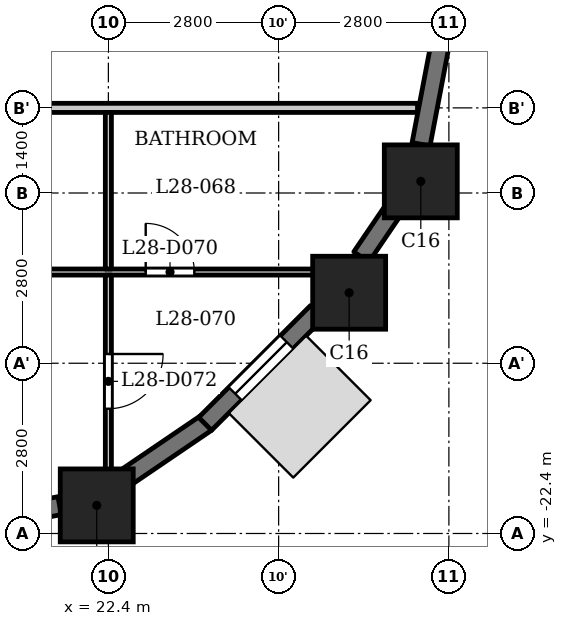
"""IFC4 building model, lengths in metres.
Left out: names, types, materials, properties, quantities, classifications, styles, units other than length and angle.
Written with IfcOpenShell. Run it as: python <this file> out.ifc"""

import sys

from ifc_helpers import new_model, si_unit, direction, frame, frame_2d, origin, origin_2d, place, context, subcontext, project, spatial, rectangle, extrude, element, fill, save


model = new_model("IFC4")
c1 = context("Model", 3, precision=1e-05, world=origin(), true_north=direction((0.0, 1.0)))
c2 = subcontext(c1, "Body", "Model", "MODEL_VIEW")
j1 = project(units=[si_unit("LENGTHUNIT", "METRE"), si_unit("PLANEANGLEUNIT", "RADIAN")], contexts=[c1])
p1 = place(None, origin())
s1 = spatial("IfcSite", under=j1, at=p1, CompositionType="ELEMENT")
p2 = place(p1, origin())
s2 = spatial("IfcBuilding", under=s1, at=p2, CompositionType="ELEMENT")
p3 = place(p2, frame((0.0, 0.0, 111.3)))
s3 = spatial("IfcBuildingStorey", under=s2, at=p3, CompositionType="ELEMENT", Elevation=111.3)
for number, where, z_axis, x_axis in (
    (1, (22.209, -21.938, 0.0), (0.0, 0.0, 1.0), (1.0, 0.0, 0.0)),
    (2, (26.36, -18.44, 0.0), (0.0, 0.0, 1.0), (1.0, 0.0, 0.0)),
    (3, (27.538, -16.609, 0.0), (0.0, 0.0, 1.0), (1.0, 0.0, 0.0)),
):
    element("IfcColumn", number, at=place(p3, frame(where, z_axis=z_axis, x_axis=x_axis)), inside=s3, PredefinedType="COLUMN", context=c2, shape_type="SweptSolid", body=[
        extrude(rectangle(XDim=1.2, YDim=1.2, at=origin_2d()), origin(), (0.0, 0.0, 1.0), 3.5),
    ])
for number, where, z_axis, x_axis in (
    (4, (19.972, -22.253, 0.0), (0.0, 0.0, 1.0), (0.982, 0.187, 0.0)),
    (5, (22.643, -21.51, 0.0), (0.0, 0.0, 1.0), (0.827, 0.562, 0.0)),
):
    element("IfcWall", number, at=place(p3, frame(where, z_axis=z_axis, x_axis=x_axis)), inside=s3, PredefinedType="SOLIDWALL", context=c2, shape_type="SweptSolid", body=[
        extrude(rectangle(XDim=1.656, YDim=0.3, at=frame_2d((0.828, 0.0))), origin(), (0.0, 0.0, 1.0), 2.4),
    ])
p4 = place(p3, frame((23.991, -20.597, 0.0), z_axis=(0.0, 0.0, 1.0), x_axis=(0.707106781187, 0.707106781187, 0.0)))
e6 = element("IfcWall", 6, at=p4, inside=s3, PredefinedType="SOLIDWALL", context=c2, shape_type="SweptSolid", body=[
    extrude(rectangle(XDim=2.6, YDim=0.3, at=frame_2d((1.3, 0.0))), origin(), (0.0, 0.0, 1.0), 2.4),
])
p5 = place(p4, frame((0.7, 0.0, 0.6)))
e7 = element("IfcOpeningElement", 7, at=p5, cuts=e6, PredefinedType="OPENING", context=c2, shape_type="SweptSolid", body=[
    extrude(rectangle(XDim=1.2, YDim=1.55, at=frame_2d((0.6, 0.775))), frame((0.0, 0.16, 0.0), z_axis=(0.0, -1.0, 0.0), x_axis=(1.0, 0.0, 0.0)), (0.0, 0.0, 1.0), 0.32),
])
p6 = place(p3, frame((26.561, -17.851, 0.0), z_axis=(0.0, 0.0, 1.0), x_axis=(0.562173331661, 0.827019434577, 0.0)))
e8 = element("IfcWall", 8, at=p6, inside=s3, PredefinedType="SOLIDWALL", context=c2, shape_type="SweptSolid", body=[
    extrude(rectangle(XDim=0.977, YDim=0.3, at=frame_2d((0.489, 0.0))), origin(), (0.0, 0.0, 1.0), 3.2),
])
p7 = place(p3, frame((27.542, -15.999, 0.0), z_axis=(0.0, 0.0, 1.0), x_axis=(0.187349172861, 0.982293381546, 0.0)))
e9 = element("IfcWall", 9, at=p7, inside=s3, PredefinedType="SOLIDWALL", context=c2, shape_type="SweptSolid", body=[
    extrude(rectangle(XDim=1.656, YDim=0.3, at=frame_2d((0.828, 0.0))), origin(), (0.0, 0.0, 1.0), 2.4),
])
p8 = place(p3, frame((-26.19, -18.1, 0.0), z_axis=(0.0, 0.0, 1.0), x_axis=(1.0, 0.0, 0.0)))
e10 = element("IfcWall", 10, at=p8, inside=s3, PredefinedType="PARTITIONING", context=c2, shape_type="SweptSolid", body=[
    extrude(rectangle(XDim=52.63, YDim=0.1, at=frame_2d((26.315, 0.0))), origin(), (0.0, 0.0, 1.0), 3.2),
])
p9 = place(p8, frame((1.09, 0.0, 0.0)))
e11 = element("IfcOpeningElement", 11, at=p9, cuts=e10, PredefinedType="OPENING", context=c2, shape_type="SweptSolid", body=[
    extrude(rectangle(XDim=0.8, YDim=2.1, at=frame_2d((0.4, 1.05))), frame((0.0, 0.06, 0.0), z_axis=(0.0, -1.0, 0.0), x_axis=(1.0, 0.0, 0.0)), (0.0, 0.0, 1.0), 0.12),
])
p10 = place(p8, frame((4.44, 0.0, 0.0)))
e12 = element("IfcOpeningElement", 12, at=p10, cuts=e10, PredefinedType="OPENING", context=c2, shape_type="SweptSolid", body=[
    extrude(rectangle(XDim=0.9, YDim=2.1, at=frame_2d((0.45, 1.05))), frame((0.0, 0.06, 0.0), z_axis=(0.0, -1.0, 0.0), x_axis=(1.0, 0.0, 0.0)), (0.0, 0.0, 1.0), 0.12),
])
p11 = place(p8, frame((10.14, 0.0, 0.0)))
e13 = element("IfcOpeningElement", 13, at=p11, cuts=e10, PredefinedType="OPENING", context=c2, shape_type="SweptSolid", body=[
    extrude(rectangle(XDim=0.8, YDim=2.1, at=frame_2d((0.4, 1.05))), frame((0.0, 0.06, 0.0), z_axis=(0.0, -1.0, 0.0), x_axis=(1.0, 0.0, 0.0)), (0.0, 0.0, 1.0), 0.12),
])
p12 = place(p8, frame((12.74, 0.0, 0.0)))
e14 = element("IfcOpeningElement", 14, at=p12, cuts=e10, PredefinedType="OPENING", context=c2, shape_type="SweptSolid", body=[
    extrude(rectangle(XDim=0.9, YDim=2.1, at=frame_2d((0.45, 1.05))), frame((0.0, 0.06, 0.0), z_axis=(0.0, -1.0, 0.0), x_axis=(1.0, 0.0, 0.0)), (0.0, 0.0, 1.0), 0.12),
])
p13 = place(p8, frame((16.14, 0.0, 0.0)))
e15 = element("IfcOpeningElement", 15, at=p13, cuts=e10, PredefinedType="OPENING", context=c2, shape_type="SweptSolid", body=[
    extrude(rectangle(XDim=0.9, YDim=2.1, at=frame_2d((0.45, 1.05))), frame((0.0, 0.06, 0.0), z_axis=(0.0, -1.0, 0.0), x_axis=(1.0, 0.0, 0.0)), (0.0, 0.0, 1.0), 0.12),
])
p14 = place(p8, frame((18.99, 0.0, 0.0)))
e16 = element("IfcOpeningElement", 16, at=p14, cuts=e10, PredefinedType="OPENING", context=c2, shape_type="SweptSolid", body=[
    extrude(rectangle(XDim=0.9, YDim=2.1, at=frame_2d((0.45, 1.05))), frame((0.0, 0.06, 0.0), z_axis=(0.0, -1.0, 0.0), x_axis=(1.0, 0.0, 0.0)), (0.0, 0.0, 1.0), 0.12),
])
p15 = place(p8, frame((26.84, 0.0, 0.0)))
e17 = element("IfcOpeningElement", 17, at=p15, cuts=e10, PredefinedType="OPENING", context=c2, shape_type="SweptSolid", body=[
    extrude(rectangle(XDim=0.8, YDim=2.1, at=frame_2d((0.4, 1.05))), frame((0.0, 0.06, 0.0), z_axis=(0.0, -1.0, 0.0), x_axis=(1.0, 0.0, 0.0)), (0.0, 0.0, 1.0), 0.12),
])
p16 = place(p8, frame((21.24, 0.0, 0.0)))
e18 = element("IfcOpeningElement", 18, at=p16, cuts=e10, PredefinedType="OPENING", context=c2, shape_type="SweptSolid", body=[
    extrude(rectangle(XDim=0.9, YDim=2.1, at=frame_2d((0.45, 1.05))), frame((0.0, 0.06, 0.0), z_axis=(0.0, -1.0, 0.0), x_axis=(1.0, 0.0, 0.0)), (0.0, 0.0, 1.0), 0.12),
])
p17 = place(p8, frame((32.54, 0.0, 0.0)))
e19 = element("IfcOpeningElement", 19, at=p17, cuts=e10, PredefinedType="OPENING", context=c2, shape_type="SweptSolid", body=[
    extrude(rectangle(XDim=0.8, YDim=2.1, at=frame_2d((0.4, 1.05))), frame((0.0, 0.06, 0.0), z_axis=(0.0, -1.0, 0.0), x_axis=(1.0, 0.0, 0.0)), (0.0, 0.0, 1.0), 0.12),
])
p18 = place(p8, frame((35.14, 0.0, 0.0)))
e20 = element("IfcOpeningElement", 20, at=p18, cuts=e10, PredefinedType="OPENING", context=c2, shape_type="SweptSolid", body=[
    extrude(rectangle(XDim=0.9, YDim=2.1, at=frame_2d((0.45, 1.05))), frame((0.0, 0.06, 0.0), z_axis=(0.0, -1.0, 0.0), x_axis=(1.0, 0.0, 0.0)), (0.0, 0.0, 1.0), 0.12),
])
p19 = place(p8, frame((38.54, 0.0, 0.0)))
e21 = element("IfcOpeningElement", 21, at=p19, cuts=e10, PredefinedType="OPENING", context=c2, shape_type="SweptSolid", body=[
    extrude(rectangle(XDim=0.9, YDim=2.1, at=frame_2d((0.45, 1.05))), frame((0.0, 0.06, 0.0), z_axis=(0.0, -1.0, 0.0), x_axis=(1.0, 0.0, 0.0)), (0.0, 0.0, 1.0), 0.12),
])
p20 = place(p8, frame((41.39, 0.0, 0.0)))
e22 = element("IfcOpeningElement", 22, at=p20, cuts=e10, PredefinedType="OPENING", context=c2, shape_type="SweptSolid", body=[
    extrude(rectangle(XDim=0.9, YDim=2.1, at=frame_2d((0.45, 1.05))), frame((0.0, 0.06, 0.0), z_axis=(0.0, -1.0, 0.0), x_axis=(1.0, 0.0, 0.0)), (0.0, 0.0, 1.0), 0.12),
])
p21 = place(p8, frame((49.204, 0.0, 0.0)))
e23 = element("IfcOpeningElement", 23, at=p21, cuts=e10, PredefinedType="OPENING", context=c2, shape_type="SweptSolid", body=[
    extrude(rectangle(XDim=0.8, YDim=2.1, at=frame_2d((0.4, 1.05))), frame((0.0, 0.06, 0.0), z_axis=(0.0, -1.0, 0.0), x_axis=(1.0, 0.0, 0.0)), (0.0, 0.0, 1.0), 0.12),
])
p22 = place(p8, frame((43.64, 0.0, 0.0)))
e24 = element("IfcOpeningElement", 24, at=p22, cuts=e10, PredefinedType="OPENING", context=c2, shape_type="SweptSolid", body=[
    extrude(rectangle(XDim=0.9, YDim=2.1, at=frame_2d((0.45, 1.05))), frame((0.0, 0.06, 0.0), z_axis=(0.0, -1.0, 0.0), x_axis=(1.0, 0.0, 0.0)), (0.0, 0.0, 1.0), 0.12),
])
p23 = place(p3, frame((-27.484, -15.4, 0.0), z_axis=(0.0, 0.0, 1.0), x_axis=(1.0, 0.0, 0.0)))
e25 = element("IfcWall", 25, at=p23, inside=s3, PredefinedType="PARTITIONING", context=c2, shape_type="SweptSolid", body=[
    extrude(rectangle(XDim=54.968, YDim=0.15, at=frame_2d((27.484, 0.0))), origin(), (0.0, 0.0, 1.0), 3.2),
])
p24 = place(p23, frame((5.734, 0.0, 0.0)))
e26 = element("IfcOpeningElement", 26, at=p24, cuts=e25, PredefinedType="OPENING", context=c2, shape_type="SweptSolid", body=[
    extrude(rectangle(XDim=1.0, YDim=2.1, at=frame_2d((0.5, 1.05))), frame((0.0, 0.085, 0.0), z_axis=(0.0, -1.0, 0.0), x_axis=(1.0, 0.0, 0.0)), (0.0, 0.0, 1.0), 0.17),
])
p25 = place(p23, frame((16.934, 0.0, 0.0)))
e27 = element("IfcOpeningElement", 27, at=p25, cuts=e25, PredefinedType="OPENING", context=c2, shape_type="SweptSolid", body=[
    extrude(rectangle(XDim=1.0, YDim=2.1, at=frame_2d((0.5, 1.05))), frame((0.0, 0.085, 0.0), z_axis=(0.0, -1.0, 0.0), x_axis=(1.0, 0.0, 0.0)), (0.0, 0.0, 1.0), 0.17),
])
p26 = place(p23, frame((22.534, 0.0, 0.0)))
e28 = element("IfcOpeningElement", 28, at=p26, cuts=e25, PredefinedType="OPENING", context=c2, shape_type="SweptSolid", body=[
    extrude(rectangle(XDim=1.0, YDim=2.1, at=frame_2d((0.5, 1.05))), frame((0.0, 0.085, 0.0), z_axis=(0.0, -1.0, 0.0), x_axis=(1.0, 0.0, 0.0)), (0.0, 0.0, 1.0), 0.17),
])
p27 = place(p23, frame((39.334, 0.0, 0.0)))
e29 = element("IfcOpeningElement", 29, at=p27, cuts=e25, PredefinedType="OPENING", context=c2, shape_type="SweptSolid", body=[
    extrude(rectangle(XDim=1.0, YDim=2.1, at=frame_2d((0.5, 1.05))), frame((0.0, 0.085, 0.0), z_axis=(0.0, -1.0, 0.0), x_axis=(1.0, 0.0, 0.0)), (0.0, 0.0, 1.0), 0.17),
])
p28 = place(p23, frame((44.934, 0.0, 0.0)))
e30 = element("IfcOpeningElement", 30, at=p28, cuts=e25, PredefinedType="OPENING", context=c2, shape_type="SweptSolid", body=[
    extrude(rectangle(XDim=1.0, YDim=2.1, at=frame_2d((0.5, 1.05))), frame((0.0, 0.085, 0.0), z_axis=(0.0, -1.0, 0.0), x_axis=(1.0, 0.0, 0.0)), (0.0, 0.0, 1.0), 0.17),
])
p29 = place(p3, frame((22.4, -21.72, 0.0), z_axis=(0.0, 0.0, 1.0), x_axis=(0.0, 1.0, 0.0)))
e31 = element("IfcWall", 31, at=p29, inside=s3, PredefinedType="PARTITIONING", context=c2, shape_type="SweptSolid", body=[
    extrude(rectangle(XDim=3.57, YDim=0.1, at=frame_2d((1.785, 0.0))), origin(), (0.0, 0.0, 1.0), 3.2),
])
p30 = place(p29, frame((1.372, 0.0, 0.0)))
e32 = element("IfcOpeningElement", 32, at=p30, cuts=e31, PredefinedType="OPENING", context=c2, shape_type="SweptSolid", body=[
    extrude(rectangle(XDim=0.9, YDim=2.1, at=frame_2d((0.45, 1.05))), frame((0.0, 0.06, 0.0), z_axis=(0.0, -1.0, 0.0), x_axis=(1.0, 0.0, 0.0)), (0.0, 0.0, 1.0), 0.12),
])
p31 = place(p3, frame((22.4, -18.05, 0.0), z_axis=(0.0, 0.0, 1.0), x_axis=(0.0, 1.0, 0.0)))
e33 = element("IfcWall", 33, at=p31, inside=s3, PredefinedType="PARTITIONING", context=c2, shape_type="SweptSolid", body=[
    extrude(rectangle(XDim=2.575, YDim=0.1, at=frame_2d((1.288, 0.0))), origin(), (0.0, 0.0, 1.0), 3.2),
])
p32 = place(p21, origin())
e34 = element("IfcDoor", 34, at=p32, inside=s3, OperationType="SINGLE_SWING_RIGHT", PredefinedType="DOOR", context=c2, shape_type="SweptSolid", body=[
    extrude(rectangle(XDim=0.8, YDim=2.1, at=frame_2d((0.4, 1.05))), frame((0.0, 0.025, 0.0), z_axis=(0.0, -1.0, 0.0), x_axis=(1.0, 0.0, 0.0)), (0.0, 0.0, 1.0), 0.05),
])
fill(e23, e34)
p33 = place(p30, origin())
e35 = element("IfcDoor", 35, at=p33, inside=s3, OperationType="SINGLE_SWING_RIGHT", PredefinedType="DOOR", context=c2, shape_type="SweptSolid", body=[
    extrude(rectangle(XDim=0.9, YDim=2.1, at=frame_2d((0.45, 1.05))), frame((0.0, 0.025, 0.0), z_axis=(0.0, -1.0, 0.0), x_axis=(1.0, 0.0, 0.0)), (0.0, 0.0, 1.0), 0.05),
])
fill(e32, e35)
p34 = place(p5, origin())
e36 = element("IfcWindow", 36, at=p34, inside=s3, PartitioningType="SINGLE_PANEL", PredefinedType="WINDOW", context=c2, shape_type="SweptSolid", body=[
    extrude(rectangle(XDim=1.2, YDim=1.55, at=frame_2d((0.6, 0.775))), frame((0.0, 0.03, 0.0), z_axis=(0.0, -1.0, 0.0), x_axis=(1.0, 0.0, 0.0)), (0.0, 0.0, 1.0), 0.06),
])
fill(e7, e36)
save(model, sys.argv[1])
